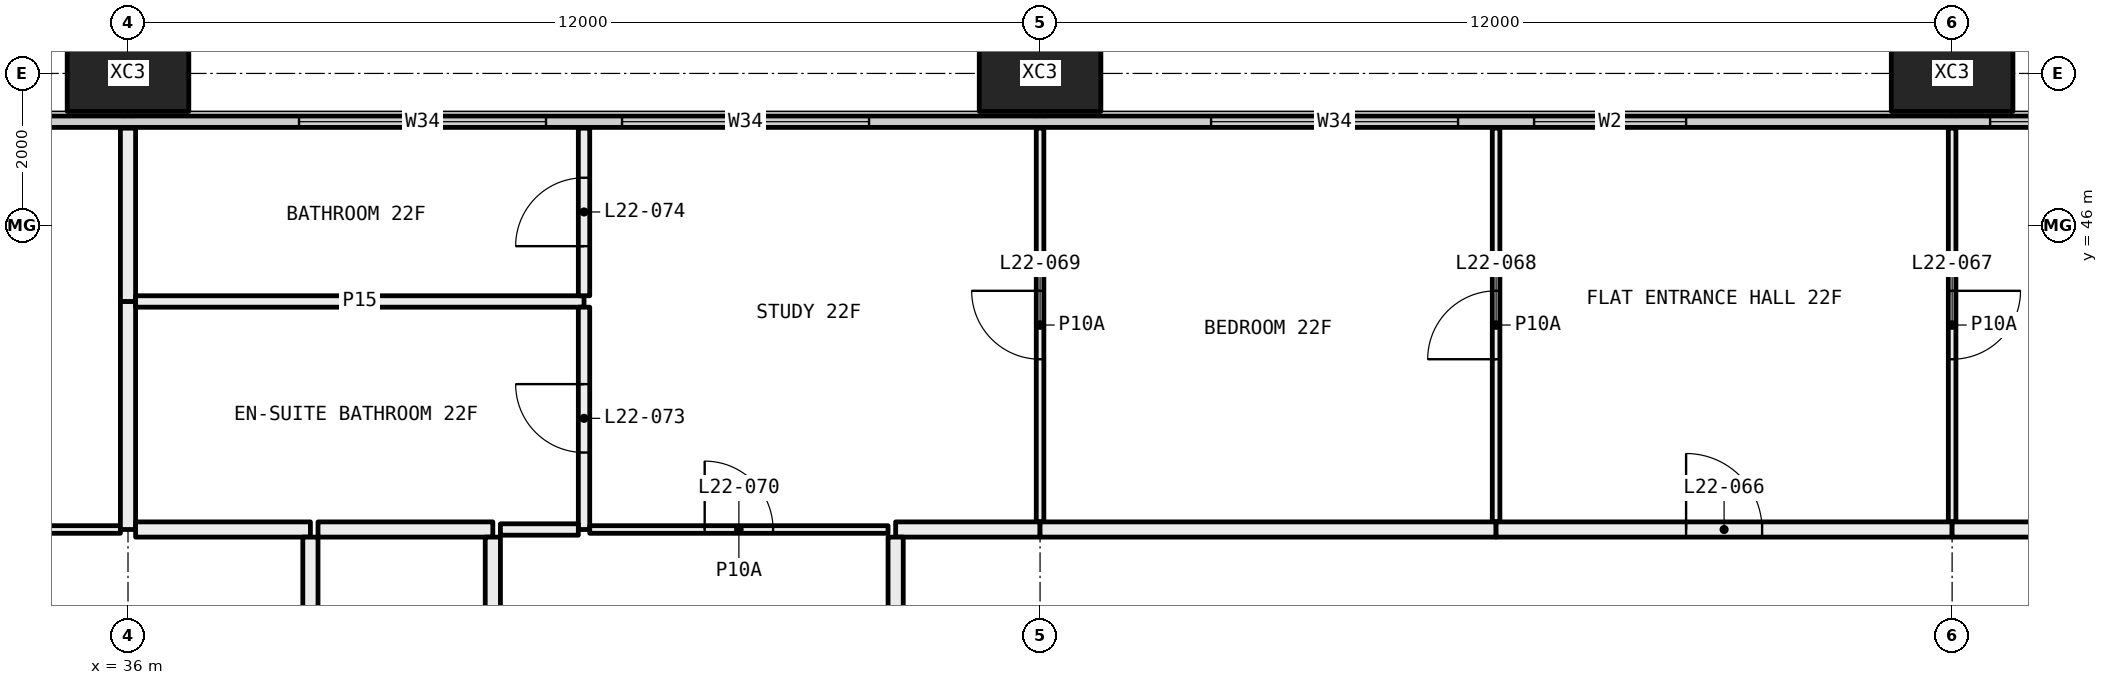
"""IFC4 building model, lengths in metres.
Left out: names, types, materials, properties, quantities, classifications, styles, units other than length and angle.
Written with IfcOpenShell. Run it as: python <this file> out.ifc"""

import sys

from ifc_helpers import new_model, si_unit, direction, frame, frame_2d, origin, origin_2d, place, context, subcontext, project, spatial, rectangle, hollow_rectangle, extrude, element, fill, save


model = new_model("IFC4")
c1 = context("Model", 3, precision=1e-05, world=origin(), true_north=direction((0.0, 1.0)))
c2 = subcontext(c1, "Body", "Model", "MODEL_VIEW")
j1 = project(units=[si_unit("LENGTHUNIT", "METRE"), si_unit("PLANEANGLEUNIT", "RADIAN")], contexts=[c1])
p1 = place(None, origin())
s1 = spatial("IfcSite", under=j1, at=p1, CompositionType="ELEMENT")
p2 = place(p1, origin())
s2 = spatial("IfcBuilding", under=s1, at=p2, CompositionType="ELEMENT")
p3 = place(p2, frame((0.0, 0.0, 88.65)))
s3 = spatial("IfcBuildingStorey", under=s2, at=p3, CompositionType="ELEMENT", Elevation=88.65)
for number, where, z_axis, x_axis in (
    (1, (36.0, 48.0, -0.4), (0.0, 0.0, 1.0), (1.0, 0.0, 0.0)),
    (2, (48.0, 48.0, -0.4), (0.0, 0.0, 1.0), (1.0, 0.0, 0.0)),
    (3, (60.0, 48.0, -0.4), (0.0, 0.0, 1.0), (1.0, 0.0, 0.0)),
):
    element("IfcColumn", number, at=place(p3, frame(where, z_axis=z_axis, x_axis=x_axis)), inside=s3, PredefinedType="COLUMN", context=c2, shape_type="SweptSolid", body=[
        extrude(hollow_rectangle(XDim=1.6, YDim=1.0, WallThickness=0.065, at=origin_2d()), origin(), (0.0, 0.0, 1.0), 3.45),
    ])
p4 = place(p3, frame((6.56, 47.365, 0.0), z_axis=(0.0, 0.0, 1.0), x_axis=(1.0, 0.0, 0.0)))
e4 = element("IfcWall", 4, at=p4, inside=s3, PredefinedType="ELEMENTEDWALL", context=c2, shape_type="SweptSolid", body=[
    extrude(rectangle(XDim=58.88, YDim=0.15, at=frame_2d((29.44, 0.0))), origin(), (0.0, 0.0, 1.0), 3.05),
])
p5 = place(p4, frame((0.44, 0.0, 0.45)))
e5 = element("IfcOpeningElement", 5, at=p5, cuts=e4, PredefinedType="OPENING", context=c2, shape_type="SweptSolid", body=[
    extrude(rectangle(XDim=4.5, YDim=2.55, at=frame_2d((2.25, 1.275))), frame((0.0, 0.085, 0.0), z_axis=(0.0, -1.0, 0.0), x_axis=(1.0, 0.0, 0.0)), (0.0, 0.0, 1.0), 0.17),
])
p6 = place(p4, frame((7.69, 0.0, 0.45)))
e6 = element("IfcOpeningElement", 6, at=p6, cuts=e4, PredefinedType="OPENING", context=c2, shape_type="SweptSolid", body=[
    extrude(rectangle(XDim=3.25, YDim=2.55, at=frame_2d((1.625, 1.275))), frame((0.0, 0.085, 0.0), z_axis=(0.0, -1.0, 0.0), x_axis=(1.0, 0.0, 0.0)), (0.0, 0.0, 1.0), 0.17),
])
p7 = place(p4, frame((11.94, 0.0, 0.45)))
e7 = element("IfcOpeningElement", 7, at=p7, cuts=e4, PredefinedType="OPENING", context=c2, shape_type="SweptSolid", body=[
    extrude(rectangle(XDim=3.25, YDim=2.55, at=frame_2d((1.625, 1.275))), frame((0.0, 0.085, 0.0), z_axis=(0.0, -1.0, 0.0), x_axis=(1.0, 0.0, 0.0)), (0.0, 0.0, 1.0), 0.17),
])
p8 = place(p4, frame((19.69, 0.0, 0.45)))
e8 = element("IfcOpeningElement", 8, at=p8, cuts=e4, PredefinedType="OPENING", context=c2, shape_type="SweptSolid", body=[
    extrude(rectangle(XDim=3.25, YDim=2.55, at=frame_2d((1.625, 1.275))), frame((0.0, 0.085, 0.0), z_axis=(0.0, -1.0, 0.0), x_axis=(1.0, 0.0, 0.0)), (0.0, 0.0, 1.0), 0.17),
])
p9 = place(p4, frame((23.94, 0.0, 0.45)))
e9 = element("IfcOpeningElement", 9, at=p9, cuts=e4, PredefinedType="OPENING", context=c2, shape_type="SweptSolid", body=[
    extrude(rectangle(XDim=2.0, YDim=2.55, at=frame_2d((1.0, 1.275))), frame((0.0, 0.085, 0.0), z_axis=(0.0, -1.0, 0.0), x_axis=(1.0, 0.0, 0.0)), (0.0, 0.0, 1.0), 0.17),
])
p10 = place(p4, frame((31.69, 0.0, 0.45)))
e10 = element("IfcOpeningElement", 10, at=p10, cuts=e4, PredefinedType="OPENING", context=c2, shape_type="SweptSolid", body=[
    extrude(rectangle(XDim=3.25, YDim=2.55, at=frame_2d((1.625, 1.275))), frame((0.0, 0.085, 0.0), z_axis=(0.0, -1.0, 0.0), x_axis=(1.0, 0.0, 0.0)), (0.0, 0.0, 1.0), 0.17),
])
p11 = place(p4, frame((35.94, 0.0, 0.45)))
e11 = element("IfcOpeningElement", 11, at=p11, cuts=e4, PredefinedType="OPENING", context=c2, shape_type="SweptSolid", body=[
    extrude(rectangle(XDim=3.25, YDim=2.55, at=frame_2d((1.625, 1.275))), frame((0.0, 0.085, 0.0), z_axis=(0.0, -1.0, 0.0), x_axis=(1.0, 0.0, 0.0)), (0.0, 0.0, 1.0), 0.17),
])
p12 = place(p4, frame((43.69, 0.0, 0.45)))
e12 = element("IfcOpeningElement", 12, at=p12, cuts=e4, PredefinedType="OPENING", context=c2, shape_type="SweptSolid", body=[
    extrude(rectangle(XDim=3.25, YDim=2.55, at=frame_2d((1.625, 1.275))), frame((0.0, 0.085, 0.0), z_axis=(0.0, -1.0, 0.0), x_axis=(1.0, 0.0, 0.0)), (0.0, 0.0, 1.0), 0.17),
])
p13 = place(p4, frame((47.94, 0.0, 0.45)))
e13 = element("IfcOpeningElement", 13, at=p13, cuts=e4, PredefinedType="OPENING", context=c2, shape_type="SweptSolid", body=[
    extrude(rectangle(XDim=2.0, YDim=2.55, at=frame_2d((1.0, 1.275))), frame((0.0, 0.085, 0.0), z_axis=(0.0, -1.0, 0.0), x_axis=(1.0, 0.0, 0.0)), (0.0, 0.0, 1.0), 0.17),
])
p14 = place(p4, frame((53.94, 0.0, 0.45)))
e14 = element("IfcOpeningElement", 14, at=p14, cuts=e4, PredefinedType="OPENING", context=c2, shape_type="SweptSolid", body=[
    extrude(rectangle(XDim=4.5, YDim=2.55, at=frame_2d((2.25, 1.275))), frame((0.0, 0.085, 0.0), z_axis=(0.0, -1.0, 0.0), x_axis=(1.0, 0.0, 0.0)), (0.0, 0.0, 1.0), 0.17),
])
p15 = place(p3, frame((34.5, 42.0, 0.0), z_axis=(0.0, 0.0, 1.0), x_axis=(1.0, 0.0, 0.0)))
e15 = element("IfcWall", 15, at=p15, inside=s3, PredefinedType="PARTITIONING", context=c2, shape_type="SweptSolid", body=[
    extrude(rectangle(XDim=1.4, YDim=0.1, at=frame_2d((0.7, 0.0))), origin(), (0.0, 0.0, 1.0), 3.05),
])
p16 = place(p3, frame((36.0, 42.0, 0.0), z_axis=(0.0, 0.0, 1.0), x_axis=(0.0, 1.0, 0.0)))
e16 = element("IfcWall", 16, at=p16, inside=s3, PredefinedType="PARTITIONING", context=c2, shape_type="SweptSolid", body=[
    extrude(rectangle(XDim=3.0, YDim=0.2, at=frame_2d((1.5, 0.0))), origin(), (0.0, 0.0, 1.0), 2.45),
])
p17 = place(p3, frame((36.0, 45.0, 0.0), z_axis=(0.0, 0.0, 1.0), x_axis=(0.0, 1.0, 0.0)))
e17 = element("IfcWall", 17, at=p17, inside=s3, PredefinedType="PARTITIONING", context=c2, shape_type="SweptSolid", body=[
    extrude(rectangle(XDim=2.28, YDim=0.2, at=frame_2d((1.14, 0.0))), origin(), (0.0, 0.0, 1.0), 2.45),
])
p18 = place(p3, frame((38.4, 42.0, 0.0), z_axis=(0.0, 0.0, 1.0), x_axis=(-1.0, 0.0, 0.0)))
e18 = element("IfcWall", 18, at=p18, inside=s3, PredefinedType="PARTITIONING", context=c2, shape_type="SweptSolid", body=[
    extrude(rectangle(XDim=2.3, YDim=0.2, at=frame_2d((1.15, 0.0))), origin(), (0.0, 0.0, 1.0), 3.05),
])
p19 = place(p3, frame((38.4, 36.1, 0.0), z_axis=(0.0, 0.0, 1.0), x_axis=(0.0, 1.0, 0.0)))
e19 = element("IfcWall", 19, at=p19, inside=s3, PredefinedType="PARTITIONING", context=c2, shape_type="SweptSolid", body=[
    extrude(rectangle(XDim=5.8, YDim=0.2, at=frame_2d((2.9, 0.0))), origin(), (0.0, 0.0, 1.0), 3.05),
])
p20 = place(p3, frame((42.0, 45.0, 0.0), z_axis=(0.0, 0.0, 1.0), x_axis=(-1.0, 0.0, 0.0)))
e20 = element("IfcWall", 20, at=p20, inside=s3, PredefinedType="PARTITIONING", context=c2, shape_type="SweptSolid", body=[
    extrude(rectangle(XDim=5.9, YDim=0.15, at=frame_2d((2.95, 0.0))), origin(), (0.0, 0.0, 1.0), 3.05),
])
p21 = place(p3, frame((42.0, 42.0, 0.0), z_axis=(0.0, 0.0, 1.0), x_axis=(0.0, 1.0, 0.0)))
e21 = element("IfcWall", 21, at=p21, inside=s3, PredefinedType="PARTITIONING", context=c2, shape_type="SweptSolid", body=[
    extrude(rectangle(XDim=2.925, YDim=0.15, at=frame_2d((1.462, 0.0))), origin(), (0.0, 0.0, 1.0), 3.05),
])
p22 = place(p21, frame((1.012, 0.0, 0.0)))
e22 = element("IfcOpeningElement", 22, at=p22, cuts=e21, PredefinedType="OPENING", context=c2, shape_type="SweptSolid", body=[
    extrude(rectangle(XDim=0.9, YDim=2.1, at=frame_2d((0.45, 1.05))), frame((0.0, 0.085, 0.0), z_axis=(0.0, -1.0, 0.0), x_axis=(1.0, 0.0, 0.0)), (0.0, 0.0, 1.0), 0.17),
])
p23 = place(p3, frame((40.9, 42.0, 0.0), z_axis=(0.0, 0.0, 1.0), x_axis=(1.0, 0.0, 0.0)))
e23 = element("IfcWall", 23, at=p23, inside=s3, PredefinedType="PARTITIONING", context=c2, shape_type="SweptSolid", body=[
    extrude(rectangle(XDim=1.025, YDim=0.15, at=frame_2d((0.513, 0.0))), origin(), (0.0, 0.0, 1.0), 3.05),
])
p24 = place(p3, frame((38.5, 42.0, 0.0), z_axis=(0.0, 0.0, 1.0), x_axis=(1.0, 0.0, 0.0)))
e24 = element("IfcWall", 24, at=p24, inside=s3, PredefinedType="PARTITIONING", context=c2, shape_type="SweptSolid", body=[
    extrude(rectangle(XDim=2.3, YDim=0.2, at=frame_2d((1.15, 0.0))), origin(), (0.0, 0.0, 1.0), 3.05),
])
p25 = place(p3, frame((42.0, 45.075, 0.0), z_axis=(0.0, 0.0, 1.0), x_axis=(0.0, 1.0, 0.0)))
e25 = element("IfcWall", 25, at=p25, inside=s3, PredefinedType="PARTITIONING", context=c2, shape_type="SweptSolid", body=[
    extrude(rectangle(XDim=2.205, YDim=0.15, at=frame_2d((1.103, 0.0))), origin(), (0.0, 0.0, 1.0), 3.05),
])
p26 = place(p25, frame((0.653, 0.0, 0.0)))
e26 = element("IfcOpeningElement", 26, at=p26, cuts=e25, PredefinedType="OPENING", context=c2, shape_type="SweptSolid", body=[
    extrude(rectangle(XDim=0.9, YDim=2.1, at=frame_2d((0.45, 1.05))), frame((0.0, 0.085, 0.0), z_axis=(0.0, -1.0, 0.0), x_axis=(1.0, 0.0, 0.0)), (0.0, 0.0, 1.0), 0.17),
])
p27 = place(p3, frame((48.0, 42.1, 0.0), z_axis=(0.0, 0.0, 1.0), x_axis=(0.0, 1.0, 0.0)))
e27 = element("IfcWall", 27, at=p27, inside=s3, PredefinedType="PARTITIONING", context=c2, shape_type="SweptSolid", body=[
    extrude(rectangle(XDim=5.18, YDim=0.1, at=frame_2d((2.59, 0.0))), origin(), (0.0, 0.0, 1.0), 3.05),
])
p28 = place(p27, frame((2.14, 0.0, 0.0)))
e28 = element("IfcOpeningElement", 28, at=p28, cuts=e27, PredefinedType="OPENING", context=c2, shape_type="SweptSolid", body=[
    extrude(rectangle(XDim=0.9, YDim=2.1, at=frame_2d((0.45, 1.05))), frame((0.0, 0.06, 0.0), z_axis=(0.0, -1.0, 0.0), x_axis=(1.0, 0.0, 0.0)), (0.0, 0.0, 1.0), 0.12),
])
p29 = place(p3, frame((42.075, 42.0, 0.0), z_axis=(0.0, 0.0, 1.0), x_axis=(1.0, 0.0, 0.0)))
e29 = element("IfcWall", 29, at=p29, inside=s3, PredefinedType="PARTITIONING", context=c2, shape_type="SweptSolid", body=[
    extrude(rectangle(XDim=3.925, YDim=0.1, at=frame_2d((1.962, 0.0))), origin(), (0.0, 0.0, 1.0), 3.05),
])
p30 = place(p29, frame((1.512, 0.0, 0.0)))
e30 = element("IfcOpeningElement", 30, at=p30, cuts=e29, PredefinedType="OPENING", context=c2, shape_type="SweptSolid", body=[
    extrude(rectangle(XDim=0.9, YDim=2.1, at=frame_2d((0.45, 1.05))), frame((0.0, 0.06, 0.0), z_axis=(0.0, -1.0, 0.0), x_axis=(1.0, 0.0, 0.0)), (0.0, 0.0, 1.0), 0.12),
])
p31 = place(p3, frame((46.1, 42.0, 0.0), z_axis=(0.0, 0.0, 1.0), x_axis=(1.0, 0.0, 0.0)))
e31 = element("IfcWall", 31, at=p31, inside=s3, PredefinedType="PARTITIONING", context=c2, shape_type="SweptSolid", body=[
    extrude(rectangle(XDim=1.9, YDim=0.2, at=frame_2d((0.95, 0.0))), origin(), (0.0, 0.0, 1.0), 3.05),
])
p32 = place(p3, frame((54.0, 42.1, 0.0), z_axis=(0.0, 0.0, 1.0), x_axis=(0.0, 1.0, 0.0)))
e32 = element("IfcWall", 32, at=p32, inside=s3, PredefinedType="PARTITIONING", context=c2, shape_type="SweptSolid", body=[
    extrude(rectangle(XDim=5.18, YDim=0.1, at=frame_2d((2.59, 0.0))), origin(), (0.0, 0.0, 1.0), 3.05),
])
p33 = place(p32, frame((2.14, 0.0, 0.0)))
e33 = element("IfcOpeningElement", 33, at=p33, cuts=e32, PredefinedType="OPENING", context=c2, shape_type="SweptSolid", body=[
    extrude(rectangle(XDim=0.9, YDim=2.1, at=frame_2d((0.45, 1.05))), frame((0.0, 0.06, 0.0), z_axis=(0.0, -1.0, 0.0), x_axis=(1.0, 0.0, 0.0)), (0.0, 0.0, 1.0), 0.12),
])
p34 = place(p3, frame((48.0, 42.0, 0.0), z_axis=(0.0, 0.0, 1.0), x_axis=(1.0, 0.0, 0.0)))
e34 = element("IfcWall", 34, at=p34, inside=s3, PredefinedType="PARTITIONING", context=c2, shape_type="SweptSolid", body=[
    extrude(rectangle(XDim=6.0, YDim=0.2, at=frame_2d((3.0, 0.0))), origin(), (0.0, 0.0, 1.0), 3.05),
])
p35 = place(p3, frame((60.0, 42.1, 0.0), z_axis=(0.0, 0.0, 1.0), x_axis=(0.0, 1.0, 0.0)))
e35 = element("IfcWall", 35, at=p35, inside=s3, PredefinedType="PARTITIONING", context=c2, shape_type="SweptSolid", body=[
    extrude(rectangle(XDim=5.18, YDim=0.1, at=frame_2d((2.59, 0.0))), origin(), (0.0, 0.0, 1.0), 3.05),
])
p36 = place(p35, frame((2.14, 0.0, 0.0)))
e36 = element("IfcOpeningElement", 36, at=p36, cuts=e35, PredefinedType="OPENING", context=c2, shape_type="SweptSolid", body=[
    extrude(rectangle(XDim=0.9, YDim=2.1, at=frame_2d((0.45, 1.05))), frame((0.0, 0.06, 0.0), z_axis=(0.0, -1.0, 0.0), x_axis=(1.0, 0.0, 0.0)), (0.0, 0.0, 1.0), 0.12),
])
p37 = place(p3, frame((54.0, 42.0, 0.0), z_axis=(0.0, 0.0, 1.0), x_axis=(1.0, 0.0, 0.0)))
e37 = element("IfcWall", 37, at=p37, inside=s3, PredefinedType="PARTITIONING", context=c2, shape_type="SweptSolid", body=[
    extrude(rectangle(XDim=6.0, YDim=0.2, at=frame_2d((3.0, 0.0))), origin(), (0.0, 0.0, 1.0), 3.05),
])
p38 = place(p37, frame((2.5, 0.0, 0.0)))
e38 = element("IfcOpeningElement", 38, at=p38, cuts=e37, PredefinedType="OPENING", context=c2, shape_type="SweptSolid", body=[
    extrude(rectangle(XDim=1.0, YDim=2.1, at=frame_2d((0.5, 1.05))), frame((0.0, 0.11, 0.0), z_axis=(0.0, -1.0, 0.0), x_axis=(1.0, 0.0, 0.0)), (0.0, 0.0, 1.0), 0.22),
])
p39 = place(p3, frame((60.0, 42.0, 0.0), z_axis=(0.0, 0.0, 1.0), x_axis=(1.0, 0.0, 0.0)))
e39 = element("IfcWall", 39, at=p39, inside=s3, PredefinedType="PARTITIONING", context=c2, shape_type="SweptSolid", body=[
    extrude(rectangle(XDim=1.8, YDim=0.2, at=frame_2d((0.9, 0.0))), origin(), (0.0, 0.0, 1.0), 3.05),
])
p40 = place(p3, frame((40.8, 41.9, 0.0), z_axis=(0.0, 0.0, 1.0), x_axis=(0.0, -1.0, 0.0)))
e40 = element("IfcWall", 40, at=p40, inside=s3, PredefinedType="PARTITIONING", context=c2, shape_type="SweptSolid", body=[
    extrude(rectangle(XDim=6.2, YDim=0.2, at=frame_2d((3.1, 0.0))), origin(), (0.0, 0.0, 1.0), 2.45),
])
p41 = place(p3, frame((46.1, 36.1, 0.0), z_axis=(0.0, 0.0, 1.0), x_axis=(0.0, 1.0, 0.0)))
e41 = element("IfcWall", 41, at=p41, inside=s3, PredefinedType="PARTITIONING", context=c2, shape_type="SweptSolid", body=[
    extrude(rectangle(XDim=5.8, YDim=0.2, at=frame_2d((2.9, 0.0))), origin(), (0.0, 0.0, 1.0), 3.05),
])
p42 = place(p10, origin())
e42 = element("IfcWindow", 42, at=p42, inside=s3, PartitioningType="SINGLE_PANEL", PredefinedType="WINDOW", context=c2, shape_type="SweptSolid", body=[
    extrude(rectangle(XDim=3.25, YDim=2.55, at=frame_2d((1.625, 1.275))), frame((0.0, 0.03, 0.0), z_axis=(0.0, -1.0, 0.0), x_axis=(1.0, 0.0, 0.0)), (0.0, 0.0, 1.0), 0.06),
])
fill(e10, e42)
p43 = place(p11, origin())
e43 = element("IfcWindow", 43, at=p43, inside=s3, PartitioningType="SINGLE_PANEL", PredefinedType="WINDOW", context=c2, shape_type="SweptSolid", body=[
    extrude(rectangle(XDim=3.25, YDim=2.55, at=frame_2d((1.625, 1.275))), frame((0.0, 0.03, 0.0), z_axis=(0.0, -1.0, 0.0), x_axis=(1.0, 0.0, 0.0)), (0.0, 0.0, 1.0), 0.06),
])
fill(e11, e43)
p44 = place(p12, origin())
e44 = element("IfcWindow", 44, at=p44, inside=s3, PartitioningType="SINGLE_PANEL", PredefinedType="WINDOW", context=c2, shape_type="SweptSolid", body=[
    extrude(rectangle(XDim=3.25, YDim=2.55, at=frame_2d((1.625, 1.275))), frame((0.0, 0.03, 0.0), z_axis=(0.0, -1.0, 0.0), x_axis=(1.0, 0.0, 0.0)), (0.0, 0.0, 1.0), 0.06),
])
fill(e12, e44)
p45 = place(p13, origin())
e45 = element("IfcWindow", 45, at=p45, inside=s3, PartitioningType="SINGLE_PANEL", PredefinedType="WINDOW", context=c2, shape_type="SweptSolid", body=[
    extrude(rectangle(XDim=2.0, YDim=2.55, at=frame_2d((1.0, 1.275))), frame((0.0, 0.03, 0.0), z_axis=(0.0, -1.0, 0.0), x_axis=(1.0, 0.0, 0.0)), (0.0, 0.0, 1.0), 0.06),
])
fill(e13, e45)
p46 = place(p14, origin())
e46 = element("IfcWindow", 46, at=p46, inside=s3, PartitioningType="SINGLE_PANEL", PredefinedType="WINDOW", context=c2, shape_type="SweptSolid", body=[
    extrude(rectangle(XDim=4.5, YDim=2.55, at=frame_2d((2.25, 1.275))), frame((0.0, 0.03, 0.0), z_axis=(0.0, -1.0, 0.0), x_axis=(1.0, 0.0, 0.0)), (0.0, 0.0, 1.0), 0.06),
])
fill(e14, e46)
p47 = place(p38, origin())
e47 = element("IfcDoor", 47, at=p47, inside=s3, OperationType="SINGLE_SWING_RIGHT", PredefinedType="DOOR", context=c2, shape_type="SweptSolid", body=[
    extrude(rectangle(XDim=1.0, YDim=2.1, at=frame_2d((0.5, 1.05))), frame((0.0, 0.025, 0.0), z_axis=(0.0, -1.0, 0.0), x_axis=(1.0, 0.0, 0.0)), (0.0, 0.0, 1.0), 0.05),
])
fill(e38, e47)
p48 = place(p36, frame((0.9, 0.0, 0.0), x_axis=(-1.0, 0.0, 0.0)))
e48 = element("IfcDoor", 48, at=p48, inside=s3, OperationType="SINGLE_SWING_RIGHT", PredefinedType="DOOR", context=c2, shape_type="SweptSolid", body=[
    extrude(rectangle(XDim=0.9, YDim=2.1, at=frame_2d((0.45, 1.05))), frame((0.0, 0.025, 0.0), z_axis=(0.0, -1.0, 0.0), x_axis=(1.0, 0.0, 0.0)), (0.0, 0.0, 1.0), 0.05),
])
fill(e36, e48)
p49 = place(p33, origin())
e49 = element("IfcDoor", 49, at=p49, inside=s3, OperationType="SINGLE_SWING_RIGHT", PredefinedType="DOOR", context=c2, shape_type="SweptSolid", body=[
    extrude(rectangle(XDim=0.9, YDim=2.1, at=frame_2d((0.45, 1.05))), frame((0.0, 0.025, 0.0), z_axis=(0.0, -1.0, 0.0), x_axis=(1.0, 0.0, 0.0)), (0.0, 0.0, 1.0), 0.05),
])
fill(e33, e49)
p50 = place(p28, origin())
e50 = element("IfcDoor", 50, at=p50, inside=s3, OperationType="SINGLE_SWING_LEFT", PredefinedType="DOOR", context=c2, shape_type="SweptSolid", body=[
    extrude(rectangle(XDim=0.9, YDim=2.1, at=frame_2d((0.45, 1.05))), frame((0.0, 0.025, 0.0), z_axis=(0.0, -1.0, 0.0), x_axis=(1.0, 0.0, 0.0)), (0.0, 0.0, 1.0), 0.05),
])
fill(e28, e50)
p51 = place(p30, origin())
e51 = element("IfcDoor", 51, at=p51, inside=s3, OperationType="SINGLE_SWING_RIGHT", PredefinedType="DOOR", context=c2, shape_type="SweptSolid", body=[
    extrude(rectangle(XDim=0.9, YDim=2.1, at=frame_2d((0.45, 1.05))), frame((0.0, 0.025, 0.0), z_axis=(0.0, -1.0, 0.0), x_axis=(1.0, 0.0, 0.0)), (0.0, 0.0, 1.0), 0.05),
])
fill(e30, e51)
p52 = place(p22, origin())
e52 = element("IfcDoor", 52, at=p52, inside=s3, OperationType="SINGLE_SWING_LEFT", PredefinedType="DOOR", context=c2, shape_type="SweptSolid", body=[
    extrude(rectangle(XDim=0.9, YDim=2.1, at=frame_2d((0.45, 1.05))), frame((0.0, 0.025, 0.0), z_axis=(0.0, -1.0, 0.0), x_axis=(1.0, 0.0, 0.0)), (0.0, 0.0, 1.0), 0.05),
])
fill(e22, e52)
p53 = place(p26, origin())
e53 = element("IfcDoor", 53, at=p53, inside=s3, OperationType="SINGLE_SWING_RIGHT", PredefinedType="DOOR", context=c2, shape_type="SweptSolid", body=[
    extrude(rectangle(XDim=0.9, YDim=2.1, at=frame_2d((0.45, 1.05))), frame((0.0, 0.025, 0.0), z_axis=(0.0, -1.0, 0.0), x_axis=(1.0, 0.0, 0.0)), (0.0, 0.0, 1.0), 0.05),
])
fill(e26, e53)
save(model, sys.argv[1])
